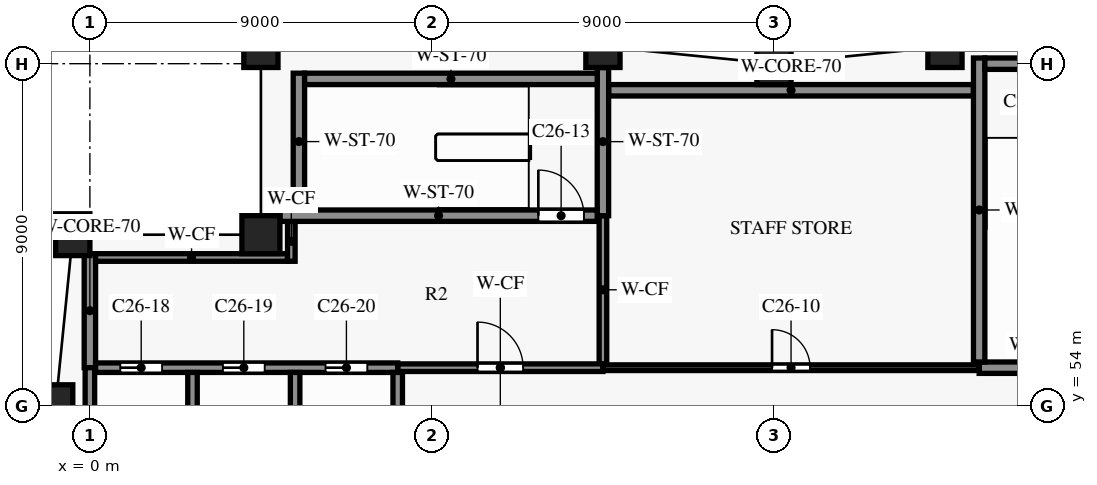
"""IFC4 building model, lengths in metres.
Left out: names, types, materials, properties, quantities, classifications, styles, units other than length and angle.
Written with IfcOpenShell. Run it as: python <this file> out.ifc"""

import sys

from ifc_helpers import new_model, si_unit, direction, frame, frame_2d, origin, origin_2d, place, context, subcontext, project, spatial, rectangle, extrude, element, fill, save


model = new_model("IFC4")
c1 = context("Model", 3, precision=1e-05, world=origin(), true_north=direction((0.0, 1.0)))
c2 = subcontext(c1, "Body", "Model", "MODEL_VIEW")
j1 = project(units=[si_unit("LENGTHUNIT", "METRE"), si_unit("PLANEANGLEUNIT", "RADIAN")], contexts=[c1])
p1 = place(None, origin())
s1 = spatial("IfcSite", under=j1, at=p1, CompositionType="ELEMENT")
p2 = place(p1, origin())
s2 = spatial("IfcBuilding", under=s1, at=p2, CompositionType="ELEMENT")
p3 = place(p2, frame((0.0, 0.0, 192.8)))
s3 = spatial("IfcBuildingStorey", under=s2, at=p3, CompositionType="ELEMENT", Elevation=192.8)
for number, where, z_axis, x_axis in (
    (1, (22.5, 63.45, 0.0), (0.0, 0.0, 1.0), (-0.995, -0.1, 0.0)),
    (2, (18.0, 63.0, 0.0), (0.0, 0.0, 1.0), (-1.0, 0.0, 0.0)),
    (3, (13.5, 63.45, 0.0), (0.0, 0.0, 1.0), (-0.995, 0.1, 0.0)),
    (4, (4.5, 63.45, 0.0), (0.0, 0.0, 1.0), (-0.995, -0.1, 0.0)),
    (5, (-0.45, 58.5, 0.0), (0.0, 0.0, 1.0), (-0.1, -0.995, 0.0)),
    (6, (-0.9, 54.0, 0.0), (0.0, 0.0, 1.0), (0.0, -1.0, 0.0)),
):
    element("IfcColumn", number, at=place(p3, frame(where, z_axis=z_axis, x_axis=x_axis)), inside=s3, PredefinedType="COLUMN", context=c2, shape_type="SweptSolid", body=[
        extrude(rectangle(XDim=0.9, YDim=1.1, at=origin_2d()), origin(), (0.0, 0.0, 1.0), 6.0),
    ])
p4 = place(p3, frame((4.5, 58.5, 0.0), z_axis=(0.0, 0.0, 1.0), x_axis=(1.0, 0.0, 0.0)))
e7 = element("IfcColumn", 7, at=p4, inside=s3, PredefinedType="COLUMN", context=c2, shape_type="SweptSolid", body=[
    extrude(rectangle(XDim=1.0, YDim=1.0, at=origin_2d()), origin(), (0.0, 0.0, 1.0), 6.0),
])
p5 = place(p3, frame((8.1, 55.0, 0.0), z_axis=(0.0, 0.0, 1.0), x_axis=(1.0, 0.0, 0.0)))
e8 = element("IfcWall", 8, at=p5, inside=s3, PredefinedType="PARTITIONING", context=c2, shape_type="SweptSolid", body=[
    extrude(rectangle(XDim=5.4, YDim=0.2, at=frame_2d((2.7, 0.0))), origin(), (0.0, 0.0, 1.0), 5.7),
])
p6 = place(p5, frame((2.1, 0.0, 0.0)))
e9 = element("IfcOpeningElement", 9, at=p6, cuts=e8, PredefinedType="OPENING", context=c2, shape_type="SweptSolid", body=[
    extrude(rectangle(XDim=1.2, YDim=2.2, at=frame_2d((0.6, 1.1))), frame((0.0, 0.11, 0.0), z_axis=(0.0, -1.0, 0.0), x_axis=(1.0, 0.0, 0.0)), (0.0, 0.0, 1.0), 0.22),
])
p7 = place(p3, frame((13.5, 55.0, 0.0), z_axis=(0.0, 0.0, 1.0), x_axis=(1.0, 0.0, 0.0)))
e10 = element("IfcWall", 10, at=p7, inside=s3, PredefinedType="PARTITIONING", context=c2, shape_type="SweptSolid", body=[
    extrude(rectangle(XDim=9.9, YDim=0.15, at=frame_2d((4.95, 0.0))), origin(), (0.0, 0.0, 1.0), 5.7),
])
p8 = place(p7, frame((4.45, 0.0, 0.0)))
e11 = element("IfcOpeningElement", 11, at=p8, cuts=e10, PredefinedType="OPENING", context=c2, shape_type="SweptSolid", body=[
    extrude(rectangle(XDim=1.0, YDim=2.1, at=frame_2d((0.5, 1.05))), frame((0.0, 0.085, 0.0), z_axis=(0.0, -1.0, 0.0), x_axis=(1.0, 0.0, 0.0)), (0.0, 0.0, 1.0), 0.17),
])
p9 = place(p3, frame((0.15, 55.0, 0.0), z_axis=(0.0, 0.0, 1.0), x_axis=(1.0, 0.0, 0.0)))
e12 = element("IfcWall", 12, at=p9, inside=s3, PredefinedType="SHEAR", context=c2, shape_type="SweptSolid", body=[
    extrude(rectangle(XDim=7.95, YDim=0.25, at=frame_2d((3.975, 0.0))), origin(), (0.0, 0.0, 1.0), 5.7),
])
p10 = place(p9, frame((0.65, 0.0, 0.0)))
e13 = element("IfcOpeningElement", 13, at=p10, cuts=e12, PredefinedType="OPENING", context=c2, shape_type="SweptSolid", body=[
    extrude(rectangle(XDim=1.1, YDim=2.1, at=frame_2d((0.55, 1.05))), frame((0.0, 0.135, 0.0), z_axis=(0.0, -1.0, 0.0), x_axis=(1.0, 0.0, 0.0)), (0.0, 0.0, 1.0), 0.27),
])
p11 = place(p9, frame((3.35, 0.0, 0.0)))
e14 = element("IfcOpeningElement", 14, at=p11, cuts=e12, PredefinedType="OPENING", context=c2, shape_type="SweptSolid", body=[
    extrude(rectangle(XDim=1.1, YDim=2.1, at=frame_2d((0.55, 1.05))), frame((0.0, 0.135, 0.0), z_axis=(0.0, -1.0, 0.0), x_axis=(1.0, 0.0, 0.0)), (0.0, 0.0, 1.0), 0.27),
])
p12 = place(p9, frame((6.05, 0.0, 0.0)))
e15 = element("IfcOpeningElement", 15, at=p12, cuts=e12, PredefinedType="OPENING", context=c2, shape_type="SweptSolid", body=[
    extrude(rectangle(XDim=1.1, YDim=2.1, at=frame_2d((0.55, 1.05))), frame((0.0, 0.135, 0.0), z_axis=(0.0, -1.0, 0.0), x_axis=(1.0, 0.0, 0.0)), (0.0, 0.0, 1.0), 0.27),
])
p13 = place(p3, frame((23.4, 55.0, 0.0), z_axis=(0.0, 0.0, 1.0), x_axis=(1.0, 0.0, 0.0)))
e16 = element("IfcWall", 16, at=p13, inside=s3, PredefinedType="SHEAR", context=c2, shape_type="SweptSolid", body=[
    extrude(rectangle(XDim=3.45, YDim=0.3, at=frame_2d((1.725, 0.0))), origin(), (0.0, 0.0, 1.0), 5.7),
])
p14 = place(p3, frame((0.15, 57.9, 0.0), z_axis=(0.0, 0.0, 1.0), x_axis=(1.0, 0.0, 0.0)))
e17 = element("IfcWall", 17, at=p14, inside=s3, PredefinedType="PARTITIONING", context=c2, shape_type="SweptSolid", body=[
    extrude(rectangle(XDim=5.05, YDim=0.2, at=frame_2d((2.525, 0.0))), origin(), (0.0, 0.0, 1.0), 5.7),
])
p15 = place(p3, frame((5.0, 59.0, 0.0), z_axis=(0.0, 0.0, 1.0), x_axis=(1.0, 0.0, 0.0)))
e18 = element("IfcWall", 18, at=p15, inside=s3, PredefinedType="SHEAR", context=c2, shape_type="SweptSolid", body=[
    extrude(rectangle(XDim=8.35, YDim=0.3, at=frame_2d((4.175, 0.0))), origin(), (0.0, 0.0, 1.0), 5.7),
])
p16 = place(p15, frame((6.8, 0.0, 0.0)))
e19 = element("IfcOpeningElement", 19, at=p16, cuts=e18, PredefinedType="OPENING", context=c2, shape_type="SweptSolid", body=[
    extrude(rectangle(XDim=1.2, YDim=2.2, at=frame_2d((0.6, 1.1))), frame((0.0, 0.16, 0.0), z_axis=(0.0, -1.0, 0.0), x_axis=(1.0, 0.0, 0.0)), (0.0, 0.0, 1.0), 0.32),
])
p17 = place(p3, frame((13.65, 62.3, 0.0), z_axis=(0.0, 0.0, 1.0), x_axis=(1.0, 0.0, 0.0)))
e20 = element("IfcWall", 20, at=p17, inside=s3, PredefinedType="SHEAR", context=c2, shape_type="SweptSolid", body=[
    extrude(rectangle(XDim=9.6, YDim=0.3, at=frame_2d((4.8, 0.0))), origin(), (0.0, 0.0, 1.0), 5.7),
])
p18 = place(p3, frame((5.65, 62.6, 0.0), z_axis=(0.0, 0.0, 1.0), x_axis=(1.0, 0.0, 0.0)))
e21 = element("IfcWall", 21, at=p18, inside=s3, PredefinedType="SHEAR", context=c2, shape_type="SweptSolid", body=[
    extrude(rectangle(XDim=7.7, YDim=0.3, at=frame_2d((3.85, 0.0))), origin(), (0.0, 0.0, 1.0), 5.7),
])
p19 = place(p3, frame((23.55, 63.0, 0.0), z_axis=(0.0, 0.0, 1.0), x_axis=(1.0, 0.0, 0.0)))
e22 = element("IfcWall", 22, at=p19, inside=s3, PredefinedType="SHEAR", context=c2, shape_type="SweptSolid", body=[
    extrude(rectangle(XDim=3.3, YDim=0.3, at=frame_2d((1.65, 0.0))), origin(), (0.0, 0.0, 1.0), 5.7),
])
p20 = place(p3, frame((0.0, 55.0, 0.0), z_axis=(0.0, 0.0, 1.0), x_axis=(0.0, 1.0, 0.0)))
e23 = element("IfcWall", 23, at=p20, inside=s3, PredefinedType="SHEAR", context=c2, shape_type="SweptSolid", body=[
    extrude(rectangle(XDim=3.0, YDim=0.3, at=frame_2d((1.5, 0.0))), origin(), (0.0, 0.0, 1.0), 5.7),
])
p21 = place(p3, frame((0.0, 51.65, 0.0), z_axis=(0.0, 0.0, 1.0), x_axis=(0.0, 1.0, 0.0)))
e24 = element("IfcWall", 24, at=p21, inside=s3, PredefinedType="SHEAR", context=c2, shape_type="SweptSolid", body=[
    extrude(rectangle(XDim=3.35, YDim=0.25, at=frame_2d((1.675, 0.0))), origin(), (0.0, 0.0, 1.0), 5.7),
])
p22 = place(p3, frame((2.7, 51.925, 0.0), z_axis=(0.0, 0.0, 1.0), x_axis=(0.0, 1.0, 0.0)))
e25 = element("IfcWall", 25, at=p22, inside=s3, PredefinedType="SHEAR", context=c2, shape_type="SweptSolid", body=[
    extrude(rectangle(XDim=2.95, YDim=0.25, at=frame_2d((1.475, 0.0))), origin(), (0.0, 0.0, 1.0), 5.7),
])
p23 = place(p3, frame((5.3, 57.8, 0.0), z_axis=(0.0, 0.0, 1.0), x_axis=(0.0, 1.0, 0.0)))
e26 = element("IfcWall", 26, at=p23, inside=s3, PredefinedType="PARTITIONING", context=c2, shape_type="SweptSolid", body=[
    extrude(rectangle(XDim=1.05, YDim=0.2, at=frame_2d((0.525, 0.0))), origin(), (0.0, 0.0, 1.0), 5.7),
])
p24 = place(p3, frame((5.4, 51.925, 0.0), z_axis=(0.0, 0.0, 1.0), x_axis=(0.0, 1.0, 0.0)))
e27 = element("IfcWall", 27, at=p24, inside=s3, PredefinedType="SHEAR", context=c2, shape_type="SweptSolid", body=[
    extrude(rectangle(XDim=2.95, YDim=0.25, at=frame_2d((1.475, 0.0))), origin(), (0.0, 0.0, 1.0), 5.7),
])
p25 = place(p3, frame((5.5, 59.15, 0.0), z_axis=(0.0, 0.0, 1.0), x_axis=(0.0, 1.0, 0.0)))
e28 = element("IfcWall", 28, at=p25, inside=s3, PredefinedType="SHEAR", context=c2, shape_type="SweptSolid", body=[
    extrude(rectangle(XDim=3.6, YDim=0.3, at=frame_2d((1.8, 0.0))), origin(), (0.0, 0.0, 1.0), 5.7),
])
p26 = place(p3, frame((8.1, 51.925, 0.0), z_axis=(0.0, 0.0, 1.0), x_axis=(0.0, 1.0, 0.0)))
e29 = element("IfcWall", 29, at=p26, inside=s3, PredefinedType="SHEAR", context=c2, shape_type="SweptSolid", body=[
    extrude(rectangle(XDim=2.95, YDim=0.25, at=frame_2d((1.475, 0.0))), origin(), (0.0, 0.0, 1.0), 5.7),
])
p27 = place(p3, frame((13.5, 55.1, 0.0), z_axis=(0.0, 0.0, 1.0), x_axis=(0.0, 1.0, 0.0)))
e30 = element("IfcWall", 30, at=p27, inside=s3, PredefinedType="PARTITIONING", context=c2, shape_type="SweptSolid", body=[
    extrude(rectangle(XDim=3.9, YDim=0.2, at=frame_2d((1.95, 0.0))), origin(), (0.0, 0.0, 1.0), 5.7),
])
p28 = place(p3, frame((13.5, 59.0, 0.0), z_axis=(0.0, 0.0, 1.0), x_axis=(0.0, 1.0, 0.0)))
e31 = element("IfcWall", 31, at=p28, inside=s3, PredefinedType="SHEAR", context=c2, shape_type="SweptSolid", body=[
    extrude(rectangle(XDim=3.897, YDim=0.3, at=frame_2d((1.949, 0.0))), origin(), (0.0, 0.0, 1.0), 5.7),
])
p29 = place(p3, frame((23.4, 55.15, 0.0), z_axis=(0.0, 0.0, 1.0), x_axis=(0.0, 1.0, 0.0)))
e32 = element("IfcWall", 32, at=p29, inside=s3, PredefinedType="SHEAR", context=c2, shape_type="SweptSolid", body=[
    extrude(rectangle(XDim=8.0, YDim=0.3, at=frame_2d((4.0, 0.0))), origin(), (0.0, 0.0, 1.0), 5.7),
])
p30 = place(p6, origin())
e33 = element("IfcDoor", 33, at=p30, inside=s3, OperationType="SINGLE_SWING_RIGHT", PredefinedType="DOOR", context=c2, shape_type="SweptSolid", body=[
    extrude(rectangle(XDim=1.2, YDim=2.2, at=frame_2d((0.6, 1.1))), frame((0.0, 0.025, 0.0), z_axis=(0.0, -1.0, 0.0), x_axis=(1.0, 0.0, 0.0)), (0.0, 0.0, 1.0), 0.05),
])
fill(e9, e33)
p31 = place(p8, origin())
e34 = element("IfcDoor", 34, at=p31, inside=s3, OperationType="SINGLE_SWING_LEFT", PredefinedType="DOOR", context=c2, shape_type="SweptSolid", body=[
    extrude(rectangle(XDim=1.0, YDim=2.1, at=frame_2d((0.5, 1.05))), frame((0.0, 0.025, 0.0), z_axis=(0.0, -1.0, 0.0), x_axis=(1.0, 0.0, 0.0)), (0.0, 0.0, 1.0), 0.05),
])
fill(e11, e34)
p32 = place(p16, origin())
e35 = element("IfcDoor", 35, at=p32, inside=s3, OperationType="SINGLE_SWING_RIGHT", PredefinedType="DOOR", context=c2, shape_type="SweptSolid", body=[
    extrude(rectangle(XDim=1.2, YDim=2.2, at=frame_2d((0.6, 1.1))), frame((0.0, 0.025, 0.0), z_axis=(0.0, -1.0, 0.0), x_axis=(1.0, 0.0, 0.0)), (0.0, 0.0, 1.0), 0.05),
])
fill(e19, e35)
p33 = place(p10, origin())
e36 = element("IfcDoor", 36, at=p33, inside=s3, OperationType="DOUBLE_DOOR_SLIDING", PredefinedType="DOOR", context=c2, shape_type="SweptSolid", body=[
    extrude(rectangle(XDim=1.1, YDim=2.1, at=frame_2d((0.55, 1.05))), frame((0.0, 0.025, 0.0), z_axis=(0.0, -1.0, 0.0), x_axis=(1.0, 0.0, 0.0)), (0.0, 0.0, 1.0), 0.05),
])
fill(e13, e36)
p34 = place(p11, origin())
e37 = element("IfcDoor", 37, at=p34, inside=s3, OperationType="DOUBLE_DOOR_SLIDING", PredefinedType="DOOR", context=c2, shape_type="SweptSolid", body=[
    extrude(rectangle(XDim=1.1, YDim=2.1, at=frame_2d((0.55, 1.05))), frame((0.0, 0.025, 0.0), z_axis=(0.0, -1.0, 0.0), x_axis=(1.0, 0.0, 0.0)), (0.0, 0.0, 1.0), 0.05),
])
fill(e14, e37)
p35 = place(p12, origin())
e38 = element("IfcDoor", 38, at=p35, inside=s3, OperationType="DOUBLE_DOOR_SLIDING", PredefinedType="DOOR", context=c2, shape_type="SweptSolid", body=[
    extrude(rectangle(XDim=1.1, YDim=2.1, at=frame_2d((0.55, 1.05))), frame((0.0, 0.025, 0.0), z_axis=(0.0, -1.0, 0.0), x_axis=(1.0, 0.0, 0.0)), (0.0, 0.0, 1.0), 0.05),
])
fill(e15, e38)
save(model, sys.argv[1])
